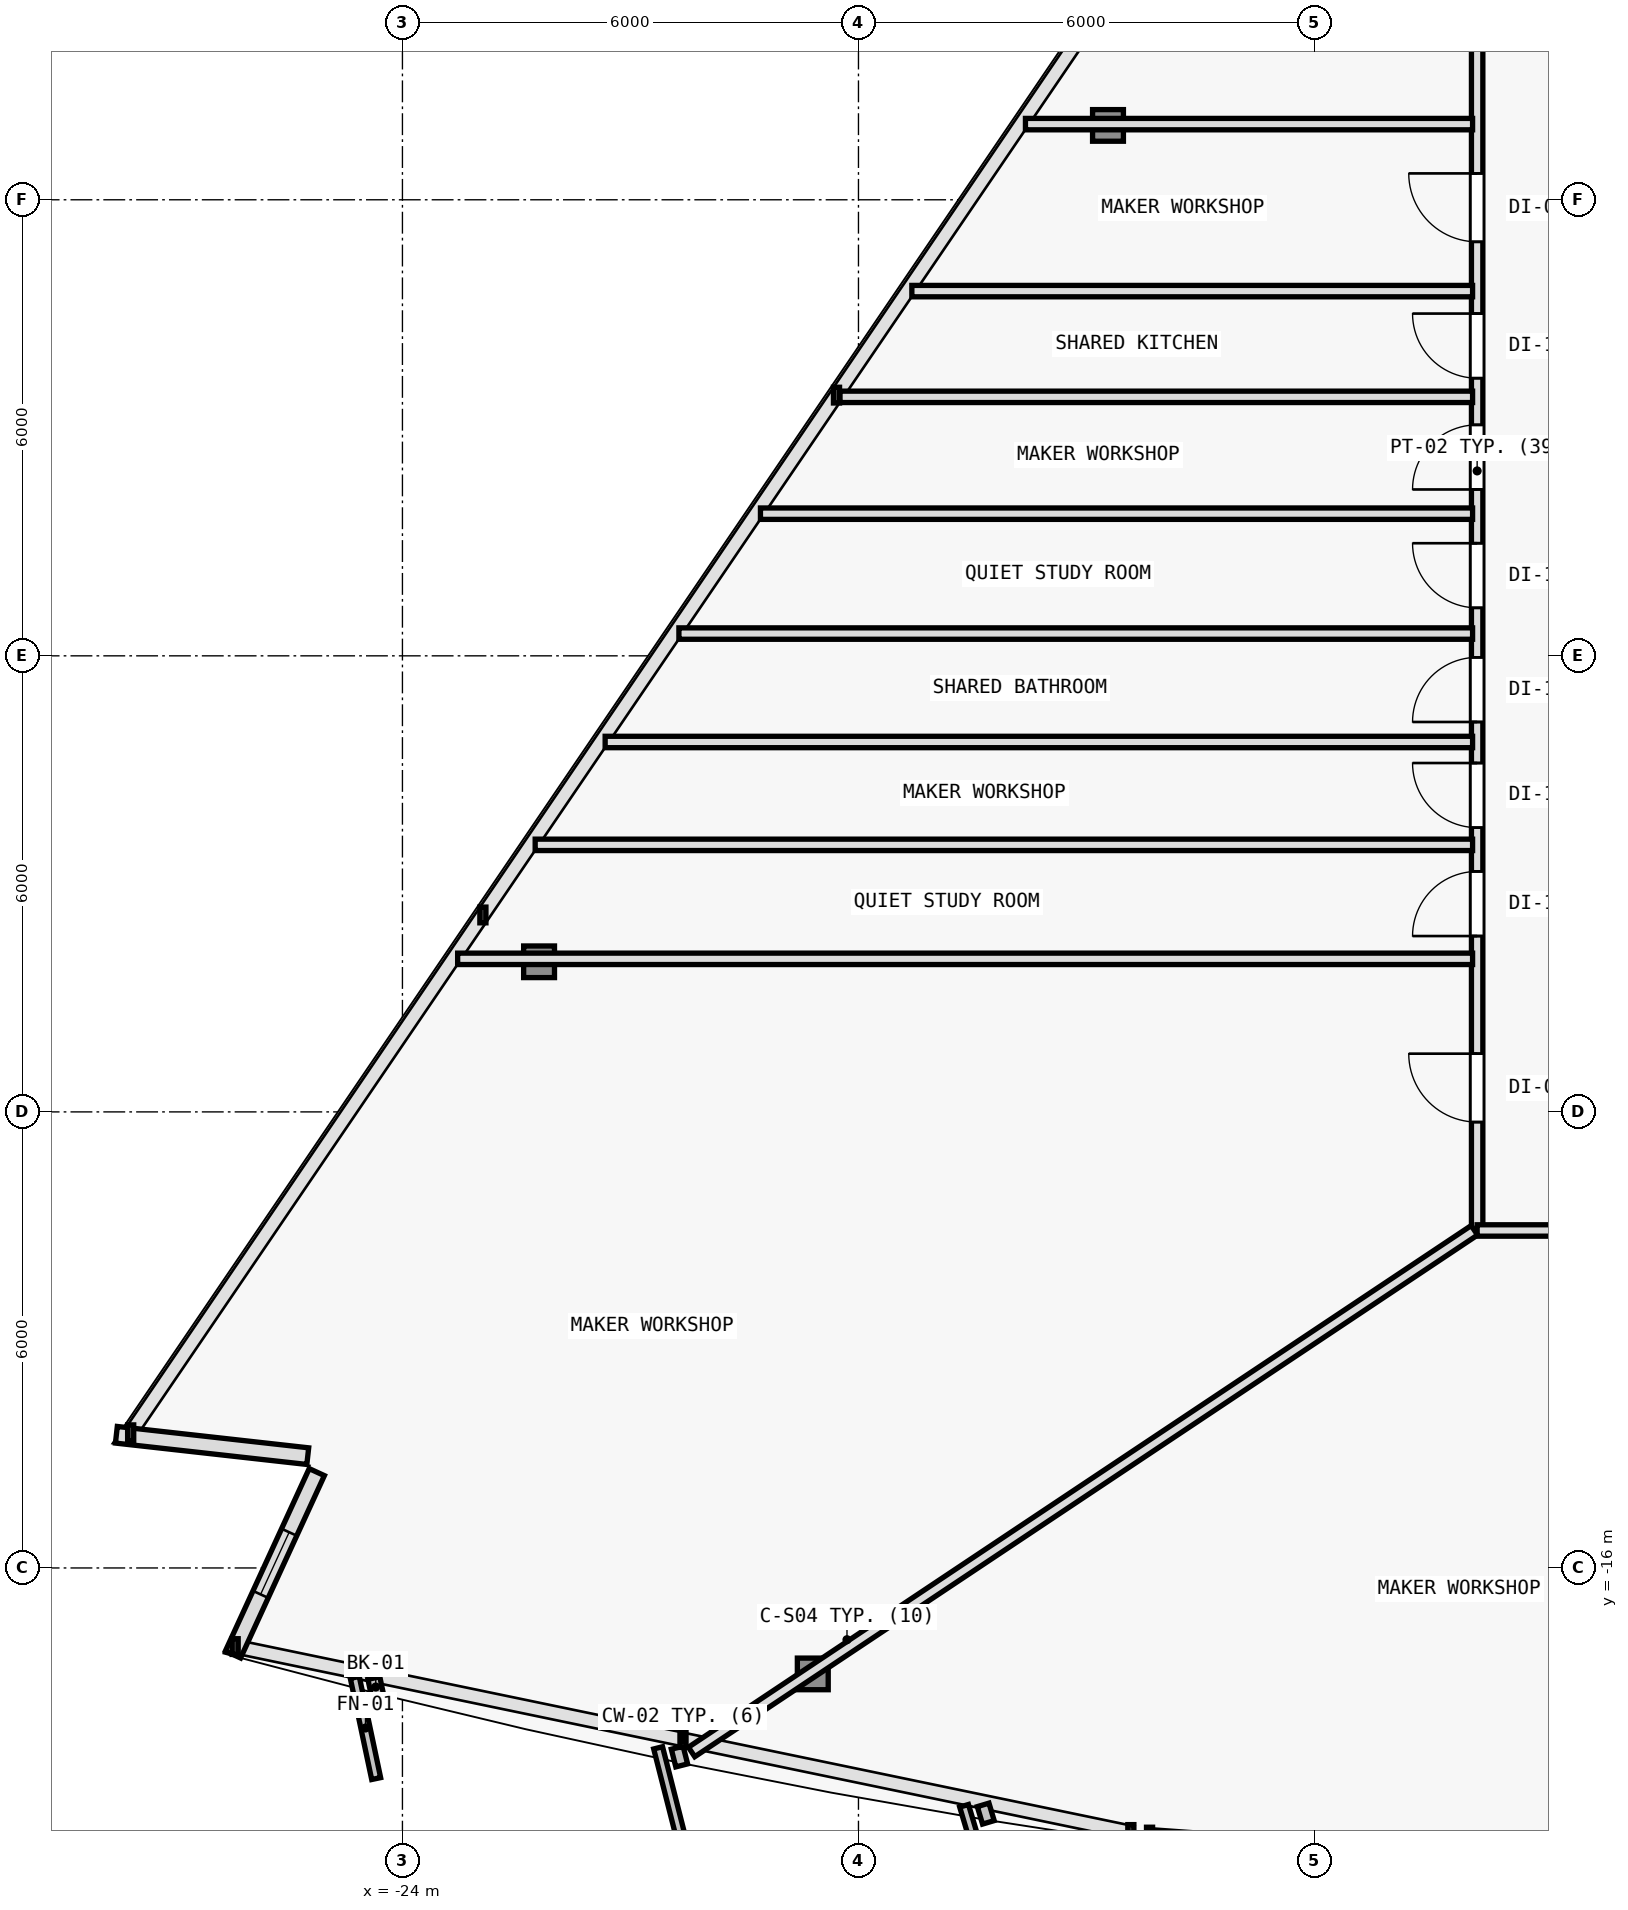
"""IFC4 building model, lengths in metres.
Left out: names, types, materials, properties, quantities, classifications, styles, units other than length and angle.
Written with IfcOpenShell. Run it as: python <this file> out.ifc"""

import sys

from ifc_helpers import new_model, si_unit, direction, frame, frame_2d, origin, origin_2d, place, context, subcontext, project, spatial, rectangle, i_section, extrude, element, fill, save


model = new_model("IFC4")
c1 = context("Model", 3, precision=1e-05, world=origin(), true_north=direction((0.0, 1.0)))
c2 = subcontext(c1, "Body", "Model", "MODEL_VIEW")
j1 = project(units=[si_unit("LENGTHUNIT", "METRE"), si_unit("PLANEANGLEUNIT", "RADIAN")], contexts=[c1])
p1 = place(None, origin())
s1 = spatial("IfcSite", under=j1, at=p1, CompositionType="ELEMENT")
p2 = place(p1, origin())
s2 = spatial("IfcBuilding", under=s1, at=p2, CompositionType="ELEMENT")
p3 = place(p2, frame((0.0, 0.0, 114.9)))
s3 = spatial("IfcBuildingStorey", under=s2, at=p3, CompositionType="ELEMENT", Elevation=114.9)
p4 = place(p3, frame((-18.601, -17.394, 0.006), z_axis=(0.020596339702, 0.033443561496, 0.99922836178), x_axis=(-0.851480003019, 0.52438707503, 0.0)))
e1 = element("IfcColumn", 1, at=p4, inside=s3, PredefinedType="COLUMN", context=c2, shape_type="SweptSolid", body=[
    extrude(i_section(OverallWidth=0.406, OverallDepth=0.416, WebThickness=0.019, FlangeThickness=0.031, FilletRadius=0.015, at=origin_2d()), origin(), (0.0, 0.0, 1.0), 3.592),
])
p5 = place(p3, frame((-14.717, 2.978, 0.006), z_axis=(0.017003561856, 0.009590008887, 0.99980943715), x_axis=(-0.491253415567, 0.871016694268, 0.0)))
e2 = element("IfcColumn", 2, at=p5, inside=s3, PredefinedType="COLUMN", context=c2, shape_type="SweptSolid", body=[
    extrude(i_section(OverallWidth=0.406, OverallDepth=0.416, WebThickness=0.019, FlangeThickness=0.031, FilletRadius=0.015, at=origin_2d()), origin(), (0.0, 0.0, 1.0), 3.59),
])
p6 = place(p3, frame((-22.202, -8.025, 0.006), z_axis=(0.025224163578, 0.021620711639, 0.999447990843), x_axis=(-0.650791373456, 0.759256602365, 0.0)))
e3 = element("IfcColumn", 3, at=p6, inside=s3, PredefinedType="COLUMN", context=c2, shape_type="SweptSolid", body=[
    extrude(i_section(OverallWidth=0.406, OverallDepth=0.416, WebThickness=0.019, FlangeThickness=0.031, FilletRadius=0.015, at=origin_2d()), origin(), (0.0, 0.0, 1.0), 3.591),
])
p7 = place(p3, frame((-25.246, -14.529, 0.0), z_axis=(0.0, 0.0, 1.0), x_axis=(-0.993831926713, 0.110896805395, 0.0)))
e4 = element("IfcWall", 4, at=p7, inside=s3, PredefinedType="SOLIDWALL", context=c2, shape_type="SweptSolid", body=[
    extrude(rectangle(XDim=2.534, YDim=0.22, at=frame_2d((1.267, 0.0))), origin(), (0.0, 0.0, 1.0), 3.35),
])
p8 = place(p3, frame((-26.229, -17.139, 0.0), z_axis=(0.0, 0.0, 1.0), x_axis=(0.417498108462, 0.908677791866, 0.0)))
e5 = element("IfcWall", 5, at=p8, inside=s3, PredefinedType="SOLIDWALL", context=c2, shape_type="SweptSolid", body=[
    extrude(rectangle(XDim=2.641, YDim=0.22, at=frame_2d((1.32, 0.0))), origin(), (0.0, 0.0, 1.0), 3.35),
])
p9 = place(p8, frame((0.87, 0.0, 0.62)))
e6 = element("IfcOpeningElement", 6, at=p9, cuts=e5, PredefinedType="OPENING", context=c2, shape_type="SweptSolid", body=[
    extrude(rectangle(XDim=0.9, YDim=1.6, at=frame_2d((0.45, 0.8))), frame((0.0, 0.12, 0.0), z_axis=(0.0, -1.0, 0.0), x_axis=(1.0, 0.0, 0.0)), (0.0, 0.0, 1.0), 0.24),
])
p10 = place(p3, frame((-9.86, -11.56, 0.0), z_axis=(0.0, 0.0, 1.0), x_axis=(0.0, 1.0, 0.0)))
e7 = element("IfcWall", 7, at=p10, inside=s3, PredefinedType="PARTITIONING", context=c2, shape_type="SweptSolid", body=[
    extrude(rectangle(XDim=19.986, YDim=0.15, at=frame_2d((9.993, 0.0))), origin(), (0.0, 0.0, 1.0), 2.705),
])
p11 = place(p10, frame((11.213, 0.0, 0.0)))
e8 = element("IfcOpeningElement", 8, at=p11, cuts=e7, PredefinedType="OPENING", context=c2, shape_type="SweptSolid", body=[
    extrude(rectangle(XDim=0.85, YDim=2.1, at=frame_2d((0.425, 1.05))), frame((0.0, 0.085, 0.0), z_axis=(0.0, -1.0, 0.0), x_axis=(1.0, 0.0, 0.0)), (0.0, 0.0, 1.0), 0.17),
])
p12 = place(p10, frame((9.749, 0.0, 0.0)))
e9 = element("IfcOpeningElement", 9, at=p12, cuts=e7, PredefinedType="OPENING", context=c2, shape_type="SweptSolid", body=[
    extrude(rectangle(XDim=0.85, YDim=2.1, at=frame_2d((0.425, 1.05))), frame((0.0, 0.085, 0.0), z_axis=(0.0, -1.0, 0.0), x_axis=(1.0, 0.0, 0.0)), (0.0, 0.0, 1.0), 0.17),
])
p13 = place(p10, frame((8.192, 0.0, 0.0)))
e10 = element("IfcOpeningElement", 10, at=p13, cuts=e7, PredefinedType="OPENING", context=c2, shape_type="SweptSolid", body=[
    extrude(rectangle(XDim=0.85, YDim=2.1, at=frame_2d((0.425, 1.05))), frame((0.0, 0.085, 0.0), z_axis=(0.0, -1.0, 0.0), x_axis=(1.0, 0.0, 0.0)), (0.0, 0.0, 1.0), 0.17),
])
p14 = place(p10, frame((6.69, 0.0, 0.0)))
e11 = element("IfcOpeningElement", 11, at=p14, cuts=e7, PredefinedType="OPENING", context=c2, shape_type="SweptSolid", body=[
    extrude(rectangle(XDim=0.85, YDim=2.1, at=frame_2d((0.425, 1.05))), frame((0.0, 0.085, 0.0), z_axis=(0.0, -1.0, 0.0), x_axis=(1.0, 0.0, 0.0)), (0.0, 0.0, 1.0), 0.17),
])
p15 = place(p10, frame((5.3, 0.0, 0.0)))
e12 = element("IfcOpeningElement", 12, at=p15, cuts=e7, PredefinedType="OPENING", context=c2, shape_type="SweptSolid", body=[
    extrude(rectangle(XDim=0.85, YDim=2.1, at=frame_2d((0.425, 1.05))), frame((0.0, 0.085, 0.0), z_axis=(0.0, -1.0, 0.0), x_axis=(1.0, 0.0, 0.0)), (0.0, 0.0, 1.0), 0.17),
])
p16 = place(p10, frame((3.874, 0.0, 0.0)))
e13 = element("IfcOpeningElement", 13, at=p16, cuts=e7, PredefinedType="OPENING", context=c2, shape_type="SweptSolid", body=[
    extrude(rectangle(XDim=0.85, YDim=2.1, at=frame_2d((0.425, 1.05))), frame((0.0, 0.085, 0.0), z_axis=(0.0, -1.0, 0.0), x_axis=(1.0, 0.0, 0.0)), (0.0, 0.0, 1.0), 0.17),
])
p17 = place(p10, frame((1.426, 0.0, 0.0)))
e14 = element("IfcOpeningElement", 14, at=p17, cuts=e7, PredefinedType="OPENING", context=c2, shape_type="SweptSolid", body=[
    extrude(rectangle(XDim=0.9, YDim=2.1, at=frame_2d((0.45, 1.05))), frame((0.0, 0.085, 0.0), z_axis=(0.0, -1.0, 0.0), x_axis=(1.0, 0.0, 0.0)), (0.0, 0.0, 1.0), 0.17),
])
p18 = place(p10, frame((13.007, 0.0, 0.0)))
e15 = element("IfcOpeningElement", 15, at=p18, cuts=e7, PredefinedType="OPENING", context=c2, shape_type="SweptSolid", body=[
    extrude(rectangle(XDim=0.9, YDim=2.1, at=frame_2d((0.45, 1.05))), frame((0.0, 0.085, 0.0), z_axis=(0.0, -1.0, 0.0), x_axis=(1.0, 0.0, 0.0)), (0.0, 0.0, 1.0), 0.17),
])
p19 = place(p3, frame((13.18, -11.56, 0.0), z_axis=(0.0, 0.0, 1.0), x_axis=(-1.0, 0.0, 0.0)))
e16 = element("IfcWall", 16, at=p19, inside=s3, PredefinedType="PARTITIONING", context=c2, shape_type="SweptSolid", body=[
    extrude(rectangle(XDim=23.04, YDim=0.15, at=frame_2d((11.52, 0.0))), origin(), (0.0, 0.0, 1.0), 2.775),
])
p20 = place(p19, frame((20.682, 0.0, 0.0)))
e17 = element("IfcOpeningElement", 17, at=p20, cuts=e16, PredefinedType="OPENING", context=c2, shape_type="SweptSolid", body=[
    extrude(rectangle(XDim=0.9, YDim=2.1, at=frame_2d((0.45, 1.05))), frame((0.0, 0.085, 0.0), z_axis=(0.0, -1.0, 0.0), x_axis=(1.0, 0.0, 0.0)), (0.0, 0.0, 1.0), 0.17),
])
p21 = place(p19, frame((12.73, 0.0, 0.0)))
e18 = element("IfcOpeningElement", 18, at=p21, cuts=e16, PredefinedType="OPENING", context=c2, shape_type="SweptSolid", body=[
    extrude(rectangle(XDim=0.9, YDim=2.1, at=frame_2d((0.45, 1.05))), frame((0.0, 0.085, 0.0), z_axis=(0.0, -1.0, 0.0), x_axis=(1.0, 0.0, 0.0)), (0.0, 0.0, 1.0), 0.17),
])
p22 = place(p19, frame((3.118, 0.0, 0.0)))
e19 = element("IfcOpeningElement", 19, at=p22, cuts=e16, PredefinedType="OPENING", context=c2, shape_type="SweptSolid", body=[
    extrude(rectangle(XDim=0.9, YDim=2.1, at=frame_2d((0.45, 1.05))), frame((0.0, 0.085, 0.0), z_axis=(0.0, -1.0, 0.0), x_axis=(1.0, 0.0, 0.0)), (0.0, 0.0, 1.0), 0.17),
])
p23 = place(p3, frame((-9.896, -11.558, 0.0), z_axis=(0.0, 0.0, 1.0), x_axis=(-0.832159529694, -0.554536308225, 0.0)))
e20 = element("IfcWall", 20, at=p23, inside=s3, PredefinedType="PARTITIONING", context=c2, shape_type="SweptSolid", body=[
    extrude(rectangle(XDim=12.377, YDim=0.15, at=frame_2d((6.188, 0.0))), origin(), (0.0, 0.0, 1.0), 2.775),
])
p24 = place(p3, frame((-9.92, 2.995, 0.0), z_axis=(0.0, 0.0, 1.0), x_axis=(-1.0, 0.0, 0.0)))
e21 = element("IfcWall", 21, at=p24, inside=s3, PredefinedType="PARTITIONING", context=c2, shape_type="SweptSolid", body=[
    extrude(rectangle(XDim=5.883, YDim=0.15, at=frame_2d((2.941, 0.0))), origin(), (0.0, 0.0, 1.0), 2.875),
])
p25 = place(p3, frame((-9.92, -7.986, 0.0), z_axis=(0.0, 0.0, 1.0), x_axis=(-1.0, 0.0, 0.0)))
e22 = element("IfcWall", 22, at=p25, inside=s3, PredefinedType="PARTITIONING", context=c2, shape_type="SweptSolid", body=[
    extrude(rectangle(XDim=13.354, YDim=0.15, at=frame_2d((6.677, 0.0))), origin(), (0.0, 0.0, 1.0), 2.705),
])
p26 = place(p3, frame((-9.92, -2.13, 0.0), z_axis=(0.0, 0.0, 1.0), x_axis=(-1.0, 0.0, 0.0)))
e23 = element("IfcWall", 23, at=p26, inside=s3, PredefinedType="PARTITIONING", context=c2, shape_type="SweptSolid", body=[
    extrude(rectangle(XDim=9.37, YDim=0.15, at=frame_2d((4.685, 0.0))), origin(), (0.0, 0.0, 1.0), 2.885),
])
p27 = place(p3, frame((-9.92, 0.798, 0.0), z_axis=(0.0, 0.0, 1.0), x_axis=(-1.0, 0.0, 0.0)))
e24 = element("IfcWall", 24, at=p27, inside=s3, PredefinedType="PARTITIONING", context=c2, shape_type="SweptSolid", body=[
    extrude(rectangle(XDim=7.378, YDim=0.15, at=frame_2d((3.689, 0.0))), origin(), (0.0, 0.0, 1.0), 2.885),
])
p28 = place(p3, frame((-9.92, -5.133, 0.0), z_axis=(0.0, 0.0, 1.0), x_axis=(-1.0, 0.0, 0.0)))
e25 = element("IfcWall", 25, at=p28, inside=s3, PredefinedType="PARTITIONING", context=c2, shape_type="SweptSolid", body=[
    extrude(rectangle(XDim=11.413, YDim=0.15, at=frame_2d((5.707, 0.0))), origin(), (0.0, 0.0, 1.0), 2.885),
])
p29 = place(p3, frame((-9.92, -0.593, 0.0), z_axis=(0.0, 0.0, 1.0), x_axis=(-1.0, 0.0, 0.0)))
e26 = element("IfcWall", 26, at=p29, inside=s3, PredefinedType="PARTITIONING", context=c2, shape_type="SweptSolid", body=[
    extrude(rectangle(XDim=8.324, YDim=0.15, at=frame_2d((4.162, 0.0))), origin(), (0.0, 0.0, 1.0), 2.885),
])
p30 = place(p3, frame((-9.92, -3.707, 0.0), z_axis=(0.0, 0.0, 1.0), x_axis=(-1.0, 0.0, 0.0)))
e27 = element("IfcWall", 27, at=p30, inside=s3, PredefinedType="PARTITIONING", context=c2, shape_type="SweptSolid", body=[
    extrude(rectangle(XDim=10.443, YDim=0.15, at=frame_2d((5.221, 0.0))), origin(), (0.0, 0.0, 1.0), 2.885),
])
p31 = place(p3, frame((-9.92, -6.487, 0.0), z_axis=(0.0, 0.0, 1.0), x_axis=(-1.0, 0.0, 0.0)))
e28 = element("IfcWall", 28, at=p31, inside=s3, PredefinedType="PARTITIONING", context=c2, shape_type="SweptSolid", body=[
    extrude(rectangle(XDim=12.333, YDim=0.15, at=frame_2d((6.167, 0.0))), origin(), (0.0, 0.0, 1.0), 2.885),
])
p32 = place(p9, origin())
e29 = element("IfcWindow", 29, at=p32, inside=s3, PartitioningType="SINGLE_PANEL", PredefinedType="WINDOW", context=c2, shape_type="SweptSolid", body=[
    extrude(rectangle(XDim=0.9, YDim=1.6, at=frame_2d((0.45, 0.8))), frame((0.0, 0.03, 0.0), z_axis=(0.0, -1.0, 0.0), x_axis=(1.0, 0.0, 0.0)), (0.0, 0.0, 1.0), 0.06),
])
fill(e6, e29)
p33 = place(p11, origin())
e30 = element("IfcDoor", 30, at=p33, inside=s3, OperationType="SINGLE_SWING_RIGHT", PredefinedType="DOOR", context=c2, shape_type="SweptSolid", body=[
    extrude(rectangle(XDim=0.85, YDim=2.1, at=frame_2d((0.425, 1.05))), frame((0.0, 0.025, 0.0), z_axis=(0.0, -1.0, 0.0), x_axis=(1.0, 0.0, 0.0)), (0.0, 0.0, 1.0), 0.05),
])
fill(e8, e30)
p34 = place(p12, origin())
e31 = element("IfcDoor", 31, at=p34, inside=s3, OperationType="SINGLE_SWING_LEFT", PredefinedType="DOOR", context=c2, shape_type="SweptSolid", body=[
    extrude(rectangle(XDim=0.85, YDim=2.1, at=frame_2d((0.425, 1.05))), frame((0.0, 0.025, 0.0), z_axis=(0.0, -1.0, 0.0), x_axis=(1.0, 0.0, 0.0)), (0.0, 0.0, 1.0), 0.05),
])
fill(e9, e31)
p35 = place(p13, origin())
e32 = element("IfcDoor", 32, at=p35, inside=s3, OperationType="SINGLE_SWING_RIGHT", PredefinedType="DOOR", context=c2, shape_type="SweptSolid", body=[
    extrude(rectangle(XDim=0.85, YDim=2.1, at=frame_2d((0.425, 1.05))), frame((0.0, 0.025, 0.0), z_axis=(0.0, -1.0, 0.0), x_axis=(1.0, 0.0, 0.0)), (0.0, 0.0, 1.0), 0.05),
])
fill(e10, e32)
p36 = place(p14, origin())
e33 = element("IfcDoor", 33, at=p36, inside=s3, OperationType="SINGLE_SWING_LEFT", PredefinedType="DOOR", context=c2, shape_type="SweptSolid", body=[
    extrude(rectangle(XDim=0.85, YDim=2.1, at=frame_2d((0.425, 1.05))), frame((0.0, 0.025, 0.0), z_axis=(0.0, -1.0, 0.0), x_axis=(1.0, 0.0, 0.0)), (0.0, 0.0, 1.0), 0.05),
])
fill(e11, e33)
p37 = place(p15, origin())
e34 = element("IfcDoor", 34, at=p37, inside=s3, OperationType="SINGLE_SWING_RIGHT", PredefinedType="DOOR", context=c2, shape_type="SweptSolid", body=[
    extrude(rectangle(XDim=0.85, YDim=2.1, at=frame_2d((0.425, 1.05))), frame((0.0, 0.025, 0.0), z_axis=(0.0, -1.0, 0.0), x_axis=(1.0, 0.0, 0.0)), (0.0, 0.0, 1.0), 0.05),
])
fill(e12, e34)
p38 = place(p16, origin())
e35 = element("IfcDoor", 35, at=p38, inside=s3, OperationType="SINGLE_SWING_LEFT", PredefinedType="DOOR", context=c2, shape_type="SweptSolid", body=[
    extrude(rectangle(XDim=0.85, YDim=2.1, at=frame_2d((0.425, 1.05))), frame((0.0, 0.025, 0.0), z_axis=(0.0, -1.0, 0.0), x_axis=(1.0, 0.0, 0.0)), (0.0, 0.0, 1.0), 0.05),
])
fill(e13, e35)
p39 = place(p17, origin())
e36 = element("IfcDoor", 36, at=p39, inside=s3, OperationType="SINGLE_SWING_RIGHT", PredefinedType="DOOR", context=c2, shape_type="SweptSolid", body=[
    extrude(rectangle(XDim=0.9, YDim=2.1, at=frame_2d((0.45, 1.05))), frame((0.0, 0.025, 0.0), z_axis=(0.0, -1.0, 0.0), x_axis=(1.0, 0.0, 0.0)), (0.0, 0.0, 1.0), 0.05),
])
fill(e14, e36)
p40 = place(p18, origin())
e37 = element("IfcDoor", 37, at=p40, inside=s3, OperationType="SINGLE_SWING_RIGHT", PredefinedType="DOOR", context=c2, shape_type="SweptSolid", body=[
    extrude(rectangle(XDim=0.9, YDim=2.1, at=frame_2d((0.45, 1.05))), frame((0.0, 0.025, 0.0), z_axis=(0.0, -1.0, 0.0), x_axis=(1.0, 0.0, 0.0)), (0.0, 0.0, 1.0), 0.05),
])
fill(e15, e37)
save(model, sys.argv[1])
